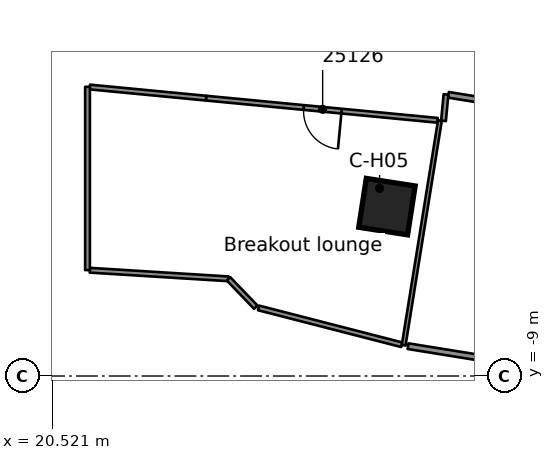
"""IFC4 building model, lengths in metres.
Left out: names, types, materials, properties, quantities, classifications, styles, units other than length and angle.
Written with IfcOpenShell. Run it as: python <this file> out.ifc"""

import sys

from ifc_helpers import new_model, si_unit, direction, frame, frame_2d, origin, origin_2d, place, context, subcontext, project, spatial, rectangle, extrude, element, fill, save


model = new_model("IFC4")
c1 = context("Model", 3, precision=1e-05, world=origin(), true_north=direction((0.0, 1.0)))
c2 = subcontext(c1, "Body", "Model", "MODEL_VIEW")
j1 = project(units=[si_unit("LENGTHUNIT", "METRE"), si_unit("PLANEANGLEUNIT", "RADIAN")], contexts=[c1])
p1 = place(None, origin())
s1 = spatial("IfcSite", under=j1, at=p1, CompositionType="ELEMENT")
p2 = place(p1, origin())
s2 = spatial("IfcBuilding", under=s1, at=p2, CompositionType="ELEMENT")
p3 = place(p2, frame((0.0, 0.0, 127.2)))
s3 = spatial("IfcBuildingStorey", under=s2, at=p3, CompositionType="ELEMENT", Elevation=127.2)
p4 = place(p3, frame((29.329, -4.543, 0.0), z_axis=(0.0, 0.0, 1.0), x_axis=(0.988215027151, -0.153072074896, 0.0)))
e1 = element("IfcColumn", 1, at=p4, inside=s3, PredefinedType="COLUMN", context=c2, shape_type="SweptSolid", body=[
    extrude(rectangle(XDim=1.3, YDim=1.3, at=origin_2d()), origin(), (0.0, 0.0, 1.0), 3.5),
])
p5 = place(p3, frame((25.95, -7.208, 0.0), z_axis=(0.0, 0.0, 1.0), x_axis=(0.968475214554, -0.249109933149, 0.0)))
e2 = element("IfcWall", 2, at=p5, inside=s3, PredefinedType="PARTITIONING", context=c2, shape_type="SweptSolid", body=[
    extrude(rectangle(XDim=3.894, YDim=0.125, at=frame_2d((1.947, 0.0))), origin(), (0.0, 0.0, 1.0), 3.08),
])
p6 = place(p3, frame((29.885, -8.215, 0.0), z_axis=(0.0, 0.0, 1.0), x_axis=(0.987236652076, -0.1592601419, 0.0)))
e3 = element("IfcWall", 3, at=p6, inside=s3, PredefinedType="PARTITIONING", context=c2, shape_type="SweptSolid", body=[
    extrude(rectangle(XDim=21.612, YDim=0.15, at=frame_2d((10.806, 0.0))), origin(), (0.0, 0.0, 1.0), 3.08),
])
p7 = place(p6, frame((7.588, 0.0, 0.0)))
e4 = element("IfcOpeningElement", 4, at=p7, cuts=e3, PredefinedType="OPENING", context=c2, shape_type="SweptSolid", body=[
    extrude(rectangle(XDim=0.9, YDim=2.1, at=frame_2d((0.45, 1.05))), frame((0.0, 0.085, 0.0), z_axis=(0.0, -1.0, 0.0), x_axis=(1.0, 0.0, 0.0)), (0.0, 0.0, 1.0), 0.17),
])
p8 = place(p3, frame((52.289, -5.044, 0.0), z_axis=(0.0, 0.0, 1.0), x_axis=(-0.987239001867, 0.159245575114, 0.0)))
e5 = element("IfcWall", 5, at=p8, inside=s3, PredefinedType="PARTITIONING", context=c2, shape_type="SweptSolid", body=[
    extrude(rectangle(XDim=21.62, YDim=0.15, at=frame_2d((10.81, 0.0))), origin(), (0.0, 0.0, 1.0), 3.08),
])
p9 = place(p8, frame((18.475, 0.0, 0.0)))
e6 = element("IfcOpeningElement", 6, at=p9, cuts=e5, PredefinedType="OPENING", context=c2, shape_type="SweptSolid", body=[
    extrude(rectangle(XDim=0.9, YDim=2.1, at=frame_2d((0.45, 1.05))), frame((0.0, 0.085, 0.0), z_axis=(0.0, -1.0, 0.0), x_axis=(1.0, 0.0, 0.0)), (0.0, 0.0, 1.0), 0.17),
])
p10 = place(p3, frame((30.661, -2.272, 0.0), z_axis=(0.0, 0.0, 1.0), x_axis=(-0.99545016826, 0.095283589939, 0.0)))
e7 = element("IfcWall", 7, at=p10, inside=s3, PredefinedType="PARTITIONING", context=c2, shape_type="SweptSolid", body=[
    extrude(rectangle(XDim=6.119, YDim=0.125, at=frame_2d((3.059, 0.0))), origin(), (0.0, 0.0, 1.0), 3.08),
])
p11 = place(p10, frame((2.538, 0.0, 0.0)))
e8 = element("IfcOpeningElement", 8, at=p11, cuts=e7, PredefinedType="OPENING", context=c2, shape_type="SweptSolid", body=[
    extrude(rectangle(XDim=1.0, YDim=2.1, at=frame_2d((0.5, 1.05))), frame((0.0, 0.073, 0.0), z_axis=(0.0, -1.0, 0.0), x_axis=(1.0, 0.0, 0.0)), (0.0, 0.0, 1.0), 0.145),
])
p12 = place(p3, frame((21.512, -1.396, 0.0), z_axis=(0.0, 0.0, 1.0), x_axis=(0.995439564575, -0.095394304224, 0.0)))
e9 = element("IfcWall", 9, at=p12, inside=s3, PredefinedType="PARTITIONING", context=c2, shape_type="SweptSolid", body=[
    extrude(rectangle(XDim=3.071, YDim=0.125, at=frame_2d((1.536, 0.0))), origin(), (0.0, 0.0, 1.0), 3.08),
])
p13 = place(p3, frame((21.512, -6.217, 0.0), z_axis=(0.0, 0.0, 1.0), x_axis=(0.998085189805, -0.061854295661, 0.0)))
e10 = element("IfcWall", 10, at=p13, inside=s3, PredefinedType="PARTITIONING", context=c2, shape_type="SweptSolid", body=[
    extrude(rectangle(XDim=3.655, YDim=0.125, at=frame_2d((1.828, 0.0))), origin(), (0.0, 0.0, 1.0), 3.08),
])
p14 = place(p3, frame((29.769, -8.19, 0.0), z_axis=(0.0, 0.0, 1.0), x_axis=(0.15928627412, 0.987232436094, 0.0)))
e11 = element("IfcWall", 11, at=p14, inside=s3, PredefinedType="PARTITIONING", context=c2, shape_type="SweptSolid", body=[
    extrude(rectangle(XDim=5.988, YDim=0.1, at=frame_2d((2.994, 0.0))), origin(), (0.0, 0.0, 1.0), 3.08),
])
p15 = place(p3, frame((30.817, -2.287, 0.0), z_axis=(0.0, 0.0, 1.0), x_axis=(0.094627831228, 0.995512718933, 0.0)))
e12 = element("IfcWall", 12, at=p15, inside=s3, PredefinedType="PARTITIONING", context=c2, shape_type="SweptSolid", body=[
    extrude(rectangle(XDim=0.699, YDim=0.125, at=frame_2d((0.35, 0.0))), origin(), (0.0, 0.0, 1.0), 3.08),
])
p16 = place(p3, frame((25.877, -7.189, 0.0), z_axis=(0.0, 0.0, 1.0), x_axis=(-0.693047408392, 0.72089200975, 0.0)))
e13 = element("IfcWall", 13, at=p16, inside=s3, PredefinedType="PARTITIONING", context=c2, shape_type="SweptSolid", body=[
    extrude(rectangle(XDim=1.035, YDim=0.125, at=frame_2d((0.517, 0.0))), origin(), (0.0, 0.0, 1.0), 3.08),
])
p17 = place(p3, frame((21.45, -6.213, 0.0), z_axis=(0.0, 0.0, 1.0), x_axis=(0.0, 1.0, 0.0)))
e14 = element("IfcWall", 14, at=p17, inside=s3, PredefinedType="PARTITIONING", context=c2, shape_type="SweptSolid", body=[
    extrude(rectangle(XDim=4.823, YDim=0.125, at=frame_2d((2.412, 0.0))), origin(), (0.0, 0.0, 1.0), 3.08),
])
p18 = place(p11, origin())
e15 = element("IfcDoor", 15, at=p18, inside=s3, OperationType="SINGLE_SWING_LEFT", PredefinedType="DOOR", context=c2, shape_type="SweptSolid", body=[
    extrude(rectangle(XDim=1.0, YDim=2.1, at=frame_2d((0.5, 1.05))), frame((0.0, 0.025, 0.0), z_axis=(0.0, -1.0, 0.0), x_axis=(1.0, 0.0, 0.0)), (0.0, 0.0, 1.0), 0.05),
])
fill(e8, e15)
save(model, sys.argv[1])
